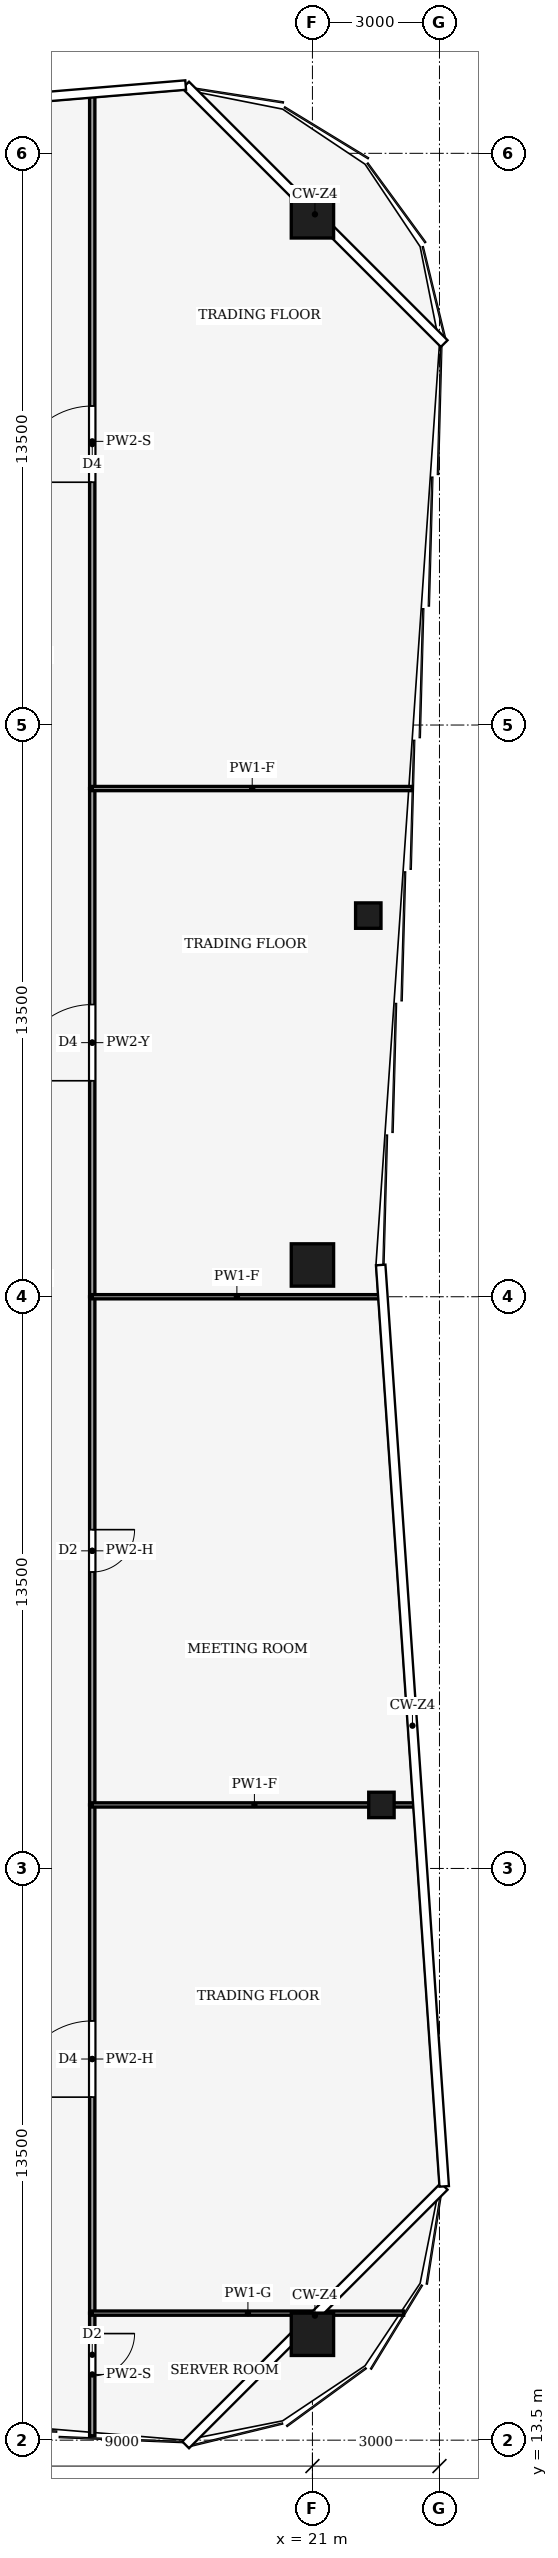
"""IFC4 building model, lengths in metres.
Left out: names, types, materials, properties, quantities, classifications, styles, units other than length and angle.
Written with IfcOpenShell. Run it as: python <this file> out.ifc"""

import sys

from ifc_helpers import new_model, si_unit, direction, frame, frame_2d, origin, origin_2d, place, context, subcontext, project, spatial, rectangle, hollow_rectangle, extrude, element, fill, save


model = new_model("IFC4")
c1 = context("Model", 3, precision=1e-05, world=origin(), true_north=direction((0.0, 1.0)))
c2 = subcontext(c1, "Body", "Model", "MODEL_VIEW")
j1 = project(units=[si_unit("LENGTHUNIT", "METRE"), si_unit("PLANEANGLEUNIT", "RADIAN")], contexts=[c1])
p1 = place(None, origin())
s1 = spatial("IfcSite", under=j1, at=p1, CompositionType="ELEMENT")
p2 = place(p1, origin())
s2 = spatial("IfcBuilding", under=s1, at=p2, CompositionType="ELEMENT")
p3 = place(p2, frame((0.0, 0.0, 258.0)))
s3 = spatial("IfcBuildingStorey", under=s2, at=p3, CompositionType="ELEMENT", Elevation=258.0)
for number, where, z_axis, x_axis in (
    (1, (21.0, 66.0, 0.0), (0.0, 0.0, 1.0), (1.0, 0.0, 0.0)),
    (2, (21.0, 41.25, 0.0), (0.0, 0.0, 1.0), (1.0, 0.0, 0.0)),
    (3, (21.0, 16.0, 0.0), (0.0, 0.0, 1.0), (1.0, 0.0, 0.0)),
):
    element("IfcColumn", number, at=place(p3, frame(where, z_axis=z_axis, x_axis=x_axis)), inside=s3, PredefinedType="COLUMN", context=c2, shape_type="SweptSolid", body=[
        extrude(hollow_rectangle(XDim=1.0, YDim=1.0, WallThickness=0.045, at=origin_2d()), origin(), (0.0, 0.0, 1.0), 4.0),
    ])
for number, where, z_axis, x_axis in (
    (4, (22.629, 28.5, 0.0), (0.0, 0.0, 1.0), (1.0, 0.0, 0.0)),
    (5, (22.319, 49.5, 0.0), (0.0, 0.0, 1.0), (1.0, 0.0, 0.0)),
):
    element("IfcColumn", number, at=place(p3, frame(where, z_axis=z_axis, x_axis=x_axis)), inside=s3, PredefinedType="COLUMN", context=c2, shape_type="SweptSolid", body=[
        extrude(hollow_rectangle(XDim=0.6, YDim=0.6, WallThickness=0.025, at=origin_2d()), origin(), (0.0, 0.0, 1.0), 4.0),
    ])
p4 = place(p3, frame((15.8, 16.5, 0.0), z_axis=(0.0, 0.0, 1.0), x_axis=(0.0, -1.0, 0.0)))
e6 = element("IfcWall", 6, at=p4, inside=s3, PredefinedType="PARTITIONING", context=c2, shape_type="SweptSolid", body=[
    extrude(rectangle(XDim=2.897, YDim=0.125, at=frame_2d((1.448, 0.0))), origin(), (0.0, 0.0, 1.0), 3.04),
])
p5 = place(p4, frame((0.483, 0.0, 0.0)))
e7 = element("IfcOpeningElement", 7, at=p5, cuts=e6, PredefinedType="OPENING", context=c2, shape_type="SweptSolid", body=[
    extrude(rectangle(XDim=1.0, YDim=2.1, at=frame_2d((0.5, 1.05))), frame((0.0, 0.073, 0.0), z_axis=(0.0, -1.0, 0.0), x_axis=(1.0, 0.0, 0.0)), (0.0, 0.0, 1.0), 0.145),
])
p6 = place(p3, frame((15.8, 16.5, 0.0), z_axis=(0.0, 0.0, 1.0), x_axis=(0.0, 1.0, 0.0)))
e8 = element("IfcWall", 8, at=p6, inside=s3, PredefinedType="PARTITIONING", context=c2, shape_type="SweptSolid", body=[
    extrude(rectangle(XDim=12.0, YDim=0.125, at=frame_2d((6.0, 0.0))), origin(), (0.0, 0.0, 1.0), 3.14),
])
p7 = place(p6, frame((5.1, 0.0, 0.0)))
e9 = element("IfcOpeningElement", 9, at=p7, cuts=e8, PredefinedType="OPENING", context=c2, shape_type="SweptSolid", body=[
    extrude(rectangle(XDim=1.8, YDim=2.1, at=frame_2d((0.9, 1.05))), frame((0.0, 0.073, 0.0), z_axis=(0.0, -1.0, 0.0), x_axis=(1.0, 0.0, 0.0)), (0.0, 0.0, 1.0), 0.145),
])
p8 = place(p3, frame((15.8, 40.5, 0.0), z_axis=(0.0, 0.0, 1.0), x_axis=(0.0, -1.0, 0.0)))
e10 = element("IfcWall", 10, at=p8, inside=s3, PredefinedType="PARTITIONING", context=c2, shape_type="SweptSolid", body=[
    extrude(rectangle(XDim=12.0, YDim=0.125, at=frame_2d((6.0, 0.0))), origin(), (0.0, 0.0, 1.0), 3.14),
])
p9 = place(p8, frame((5.5, 0.0, 0.0)))
e11 = element("IfcOpeningElement", 11, at=p9, cuts=e10, PredefinedType="OPENING", context=c2, shape_type="SweptSolid", body=[
    extrude(rectangle(XDim=1.0, YDim=2.1, at=frame_2d((0.5, 1.05))), frame((0.0, 0.073, 0.0), z_axis=(0.0, -1.0, 0.0), x_axis=(1.0, 0.0, 0.0)), (0.0, 0.0, 1.0), 0.145),
])
p10 = place(p3, frame((15.8, 40.5, 0.0), z_axis=(0.0, 0.0, 1.0), x_axis=(0.0, 1.0, 0.0)))
e12 = element("IfcWall", 12, at=p10, inside=s3, PredefinedType="PARTITIONING", context=c2, shape_type="SweptSolid", body=[
    extrude(rectangle(XDim=12.0, YDim=0.125, at=frame_2d((6.0, 0.0))), origin(), (0.0, 0.0, 1.0), 3.24),
])
p11 = place(p10, frame((5.1, 0.0, 0.0)))
e13 = element("IfcOpeningElement", 13, at=p11, cuts=e12, PredefinedType="OPENING", context=c2, shape_type="SweptSolid", body=[
    extrude(rectangle(XDim=1.8, YDim=2.1, at=frame_2d((0.9, 1.05))), frame((0.0, 0.073, 0.0), z_axis=(0.0, -1.0, 0.0), x_axis=(1.0, 0.0, 0.0)), (0.0, 0.0, 1.0), 0.145),
])
p12 = place(p3, frame((15.8, 52.5, 0.0), z_axis=(0.0, 0.0, 1.0), x_axis=(0.0, 1.0, 0.0)))
e14 = element("IfcWall", 14, at=p12, inside=s3, PredefinedType="PARTITIONING", context=c2, shape_type="SweptSolid", body=[
    extrude(rectangle(XDim=16.397, YDim=0.125, at=frame_2d((8.198, 0.0))), origin(), (0.0, 0.0, 1.0), 3.04),
])
p13 = place(p12, frame((7.233, 0.0, 0.0)))
e15 = element("IfcOpeningElement", 15, at=p13, cuts=e14, PredefinedType="OPENING", context=c2, shape_type="SweptSolid", body=[
    extrude(rectangle(XDim=1.8, YDim=2.1, at=frame_2d((0.9, 1.05))), frame((0.0, 0.073, 0.0), z_axis=(0.0, -1.0, 0.0), x_axis=(1.0, 0.0, 0.0)), (0.0, 0.0, 1.0), 0.145),
])
p14 = place(p3, frame((23.153, 16.5, 0.0), z_axis=(0.0, 0.0, 1.0), x_axis=(-1.0, 0.0, 0.0)))
e16 = element("IfcWall", 16, at=p14, inside=s3, PredefinedType="PARTITIONING", context=c2, shape_type="SweptSolid", body=[
    extrude(rectangle(XDim=7.353, YDim=0.1, at=frame_2d((3.676, 0.0))), origin(), (0.0, 0.0, 1.0), 2.93),
])
p15 = place(p3, frame((23.459, 28.5, 0.0), z_axis=(0.0, 0.0, 1.0), x_axis=(-1.0, 0.0, 0.0)))
e17 = element("IfcWall", 17, at=p15, inside=s3, PredefinedType="PARTITIONING", context=c2, shape_type="SweptSolid", body=[
    extrude(rectangle(XDim=7.659, YDim=0.1, at=frame_2d((3.83, 0.0))), origin(), (0.0, 0.0, 1.0), 3.04),
])
p16 = place(p3, frame((22.632, 40.5, 0.0), z_axis=(0.0, 0.0, 1.0), x_axis=(-1.0, 0.0, 0.0)))
e18 = element("IfcWall", 18, at=p16, inside=s3, PredefinedType="PARTITIONING", context=c2, shape_type="SweptSolid", body=[
    extrude(rectangle(XDim=6.832, YDim=0.1, at=frame_2d((3.416, 0.0))), origin(), (0.0, 0.0, 1.0), 3.04),
])
p17 = place(p3, frame((23.356, 52.5, 0.0), z_axis=(0.0, 0.0, 1.0), x_axis=(-1.0, 0.0, 0.0)))
e19 = element("IfcWall", 19, at=p17, inside=s3, PredefinedType="PARTITIONING", context=c2, shape_type="SweptSolid", body=[
    extrude(rectangle(XDim=7.556, YDim=0.1, at=frame_2d((3.778, 0.0))), origin(), (0.0, 0.0, 1.0), 3.04),
])
p18 = place(p5, origin())
e20 = element("IfcDoor", 20, at=p18, inside=s3, OperationType="SINGLE_SWING_LEFT", PredefinedType="DOOR", context=c2, shape_type="SweptSolid", body=[
    extrude(rectangle(XDim=1.0, YDim=2.1, at=frame_2d((0.5, 1.05))), frame((0.0, 0.025, 0.0), z_axis=(0.0, -1.0, 0.0), x_axis=(1.0, 0.0, 0.0)), (0.0, 0.0, 1.0), 0.05),
])
fill(e7, e20)
p19 = place(p7, origin())
e21 = element("IfcDoor", 21, at=p19, inside=s3, OperationType="DOUBLE_DOOR_SINGLE_SWING", PredefinedType="DOOR", context=c2, shape_type="SweptSolid", body=[
    extrude(rectangle(XDim=1.8, YDim=2.1, at=frame_2d((0.9, 1.05))), frame((0.0, 0.025, 0.0), z_axis=(0.0, -1.0, 0.0), x_axis=(1.0, 0.0, 0.0)), (0.0, 0.0, 1.0), 0.05),
])
fill(e9, e21)
p20 = place(p9, origin())
e22 = element("IfcDoor", 22, at=p20, inside=s3, OperationType="SINGLE_SWING_LEFT", PredefinedType="DOOR", context=c2, shape_type="SweptSolid", body=[
    extrude(rectangle(XDim=1.0, YDim=2.1, at=frame_2d((0.5, 1.05))), frame((0.0, 0.025, 0.0), z_axis=(0.0, -1.0, 0.0), x_axis=(1.0, 0.0, 0.0)), (0.0, 0.0, 1.0), 0.05),
])
fill(e11, e22)
p21 = place(p11, origin())
e23 = element("IfcDoor", 23, at=p21, inside=s3, OperationType="DOUBLE_DOOR_SINGLE_SWING", PredefinedType="DOOR", context=c2, shape_type="SweptSolid", body=[
    extrude(rectangle(XDim=1.8, YDim=2.1, at=frame_2d((0.9, 1.05))), frame((0.0, 0.025, 0.0), z_axis=(0.0, -1.0, 0.0), x_axis=(1.0, 0.0, 0.0)), (0.0, 0.0, 1.0), 0.05),
])
fill(e13, e23)
p22 = place(p13, origin())
e24 = element("IfcDoor", 24, at=p22, inside=s3, OperationType="DOUBLE_DOOR_SINGLE_SWING", PredefinedType="DOOR", context=c2, shape_type="SweptSolid", body=[
    extrude(rectangle(XDim=1.8, YDim=2.1, at=frame_2d((0.9, 1.05))), frame((0.0, 0.025, 0.0), z_axis=(0.0, -1.0, 0.0), x_axis=(1.0, 0.0, 0.0)), (0.0, 0.0, 1.0), 0.05),
])
fill(e15, e24)
save(model, sys.argv[1])
